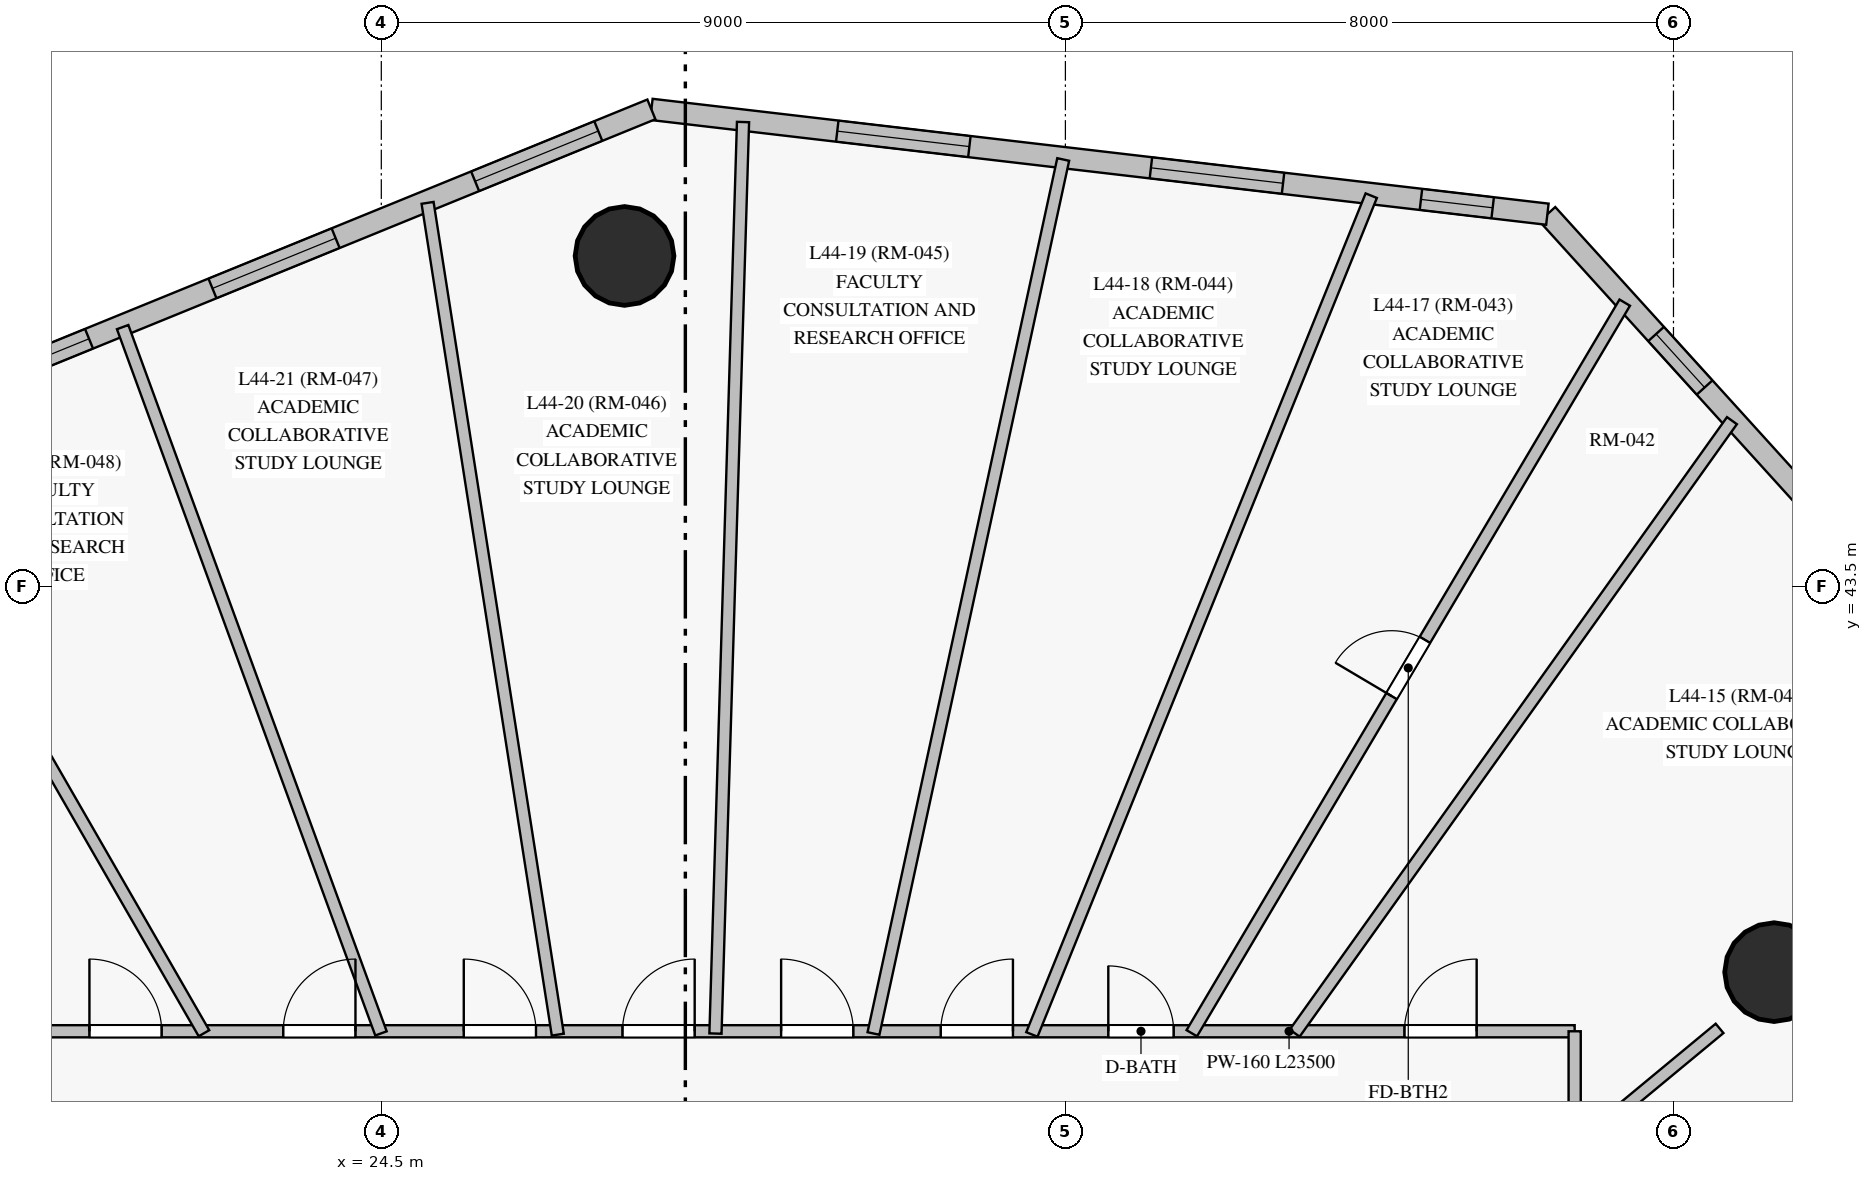
"""IFC4 building model, lengths in metres.
Left out: names, types, materials, properties, quantities, classifications, styles, units other than length and angle.
Written with IfcOpenShell. Run it as: python <this file> out.ifc"""

import sys

from ifc_helpers import new_model, si_unit, direction, frame, frame_2d, origin, origin_with_axes, origin_2d, place, context, subcontext, project, spatial, rectangle, circle, extrude, source, transform, mapped, element, fill, save


model = new_model("IFC4")
c1 = context("Model", 3, precision=1e-05, world=origin(), true_north=direction((0.0, 1.0)))
c2 = subcontext(c1, "Body", "Model", "MODEL_VIEW")
j1 = project(units=[si_unit("LENGTHUNIT", "METRE"), si_unit("PLANEANGLEUNIT", "RADIAN")], contexts=[c1])
p1 = place(None, origin())
s1 = spatial("IfcSite", under=j1, at=p1, CompositionType="ELEMENT")
p2 = place(p1, origin())
s2 = spatial("IfcBuilding", under=s1, at=p2, CompositionType="ELEMENT")
p3 = place(p2, frame((0.0, 0.0, 156.55)))
s3 = spatial("IfcBuildingStorey", under=s2, at=p3, CompositionType="ELEMENT", Elevation=156.55)
m1 = source(origin_with_axes(), c2, "Body", "SweptSolid", [
    extrude(circle(Radius=0.65, at=origin_2d()), origin(), (0.0, 0.0, 1.0), 3.05),
])
for number, where, z_axis, x_axis in (
    (1, (42.824, 38.428, 0.0), (0.0, 0.0, 1.0), (1.0, 0.0, 0.0)),
    (2, (27.7, 47.85, 0.0), (0.0, 0.0, 1.0), (1.0, 0.0, 0.0)),
):
    element("IfcColumn", number, at=place(p3, frame(where, z_axis=z_axis, x_axis=x_axis)), inside=s3, PredefinedType="COLUMN", context=c2, shape_type="MappedRepresentation", body=[
        mapped(m1, transform((0.0, 0.0, 0.0), scale=1.0)),
    ])
p4 = place(p3, frame((46.188, 41.403, 0.0), z_axis=(0.0, 0.0, 1.0), x_axis=(-0.671855500446, 0.740682243962, 0.0)))
e3 = element("IfcWall", 3, at=p4, inside=s3, PredefinedType="SOLIDWALL", context=c2, shape_type="SweptSolid", body=[
    extrude(rectangle(XDim=9.446, YDim=0.28, at=frame_2d((4.723, 0.0))), origin(), (0.0, 0.0, 1.0), 2.825),
])
p5 = place(p4, frame((2.053, 0.0, 0.85)))
e4 = element("IfcOpeningElement", 4, at=p5, cuts=e3, PredefinedType="OPENING", context=c2, shape_type="SweptSolid", body=[
    extrude(rectangle(XDim=1.75, YDim=1.65, at=frame_2d((0.875, 0.825))), frame((0.0, 0.15, 0.0), z_axis=(0.0, -1.0, 0.0), x_axis=(1.0, 0.0, 0.0)), (0.0, 0.0, 1.0), 0.3),
])
p6 = place(p4, frame((6.368, 0.0, 0.85)))
e5 = element("IfcOpeningElement", 5, at=p6, cuts=e3, PredefinedType="OPENING", context=c2, shape_type="SweptSolid", body=[
    extrude(rectangle(XDim=0.95, YDim=1.5, at=frame_2d((0.475, 0.75))), frame((0.0, 0.15, 0.0), z_axis=(0.0, -1.0, 0.0), x_axis=(1.0, 0.0, 0.0)), (0.0, 0.0, 1.0), 0.3),
])
p7 = place(p3, frame((39.841, 48.399, 0.0), z_axis=(0.0, 0.0, 1.0), x_axis=(-0.993227616233, 0.116184776764, 0.0)))
e6 = element("IfcWall", 6, at=p7, inside=s3, PredefinedType="SOLIDWALL", context=c2, shape_type="SweptSolid", body=[
    extrude(rectangle(XDim=11.868, YDim=0.28, at=frame_2d((5.934, 0.0))), origin(), (0.0, 0.0, 1.0), 2.825),
])
p8 = place(p7, frame((0.725, 0.0, 0.85)))
e7 = element("IfcOpeningElement", 7, at=p8, cuts=e6, PredefinedType="OPENING", context=c2, shape_type="SweptSolid", body=[
    extrude(rectangle(XDim=0.95, YDim=1.5, at=frame_2d((0.475, 0.75))), frame((0.0, 0.15, 0.0), z_axis=(0.0, -1.0, 0.0), x_axis=(1.0, 0.0, 0.0)), (0.0, 0.0, 1.0), 0.3),
])
p9 = place(p7, frame((3.501, 0.0, 0.85)))
e8 = element("IfcOpeningElement", 8, at=p9, cuts=e6, PredefinedType="OPENING", context=c2, shape_type="SweptSolid", body=[
    extrude(rectangle(XDim=1.75, YDim=1.65, at=frame_2d((0.875, 0.825))), frame((0.0, 0.15, 0.0), z_axis=(0.0, -1.0, 0.0), x_axis=(1.0, 0.0, 0.0)), (0.0, 0.0, 1.0), 0.3),
])
p10 = place(p7, frame((7.656, 0.0, 0.85)))
e9 = element("IfcOpeningElement", 9, at=p10, cuts=e6, PredefinedType="OPENING", context=c2, shape_type="SweptSolid", body=[
    extrude(rectangle(XDim=1.75, YDim=1.65, at=frame_2d((0.875, 0.825))), frame((0.0, 0.15, 0.0), z_axis=(0.0, -1.0, 0.0), x_axis=(1.0, 0.0, 0.0)), (0.0, 0.0, 1.0), 0.3),
])
p11 = place(p3, frame((28.053, 49.778, 0.0), z_axis=(0.0, 0.0, 1.0), x_axis=(-0.925936748152, -0.377678617903, 0.0)))
e10 = element("IfcWall", 10, at=p11, inside=s3, PredefinedType="SOLIDWALL", context=c2, shape_type="SweptSolid", body=[
    extrude(rectangle(XDim=9.466, YDim=0.28, at=frame_2d((4.733, 0.0))), origin(), (0.0, 0.0, 1.0), 2.825),
])
p12 = place(p11, frame((0.754, 0.0, 0.85)))
e11 = element("IfcOpeningElement", 11, at=p12, cuts=e10, PredefinedType="OPENING", context=c2, shape_type="SweptSolid", body=[
    extrude(rectangle(XDim=1.75, YDim=1.65, at=frame_2d((0.875, 0.825))), frame((0.0, 0.15, 0.0), z_axis=(0.0, -1.0, 0.0), x_axis=(1.0, 0.0, 0.0)), (0.0, 0.0, 1.0), 0.3),
])
p13 = place(p11, frame((4.486, 0.0, 0.85)))
e12 = element("IfcOpeningElement", 12, at=p13, cuts=e10, PredefinedType="OPENING", context=c2, shape_type="SweptSolid", body=[
    extrude(rectangle(XDim=1.75, YDim=1.65, at=frame_2d((0.875, 0.825))), frame((0.0, 0.15, 0.0), z_axis=(0.0, -1.0, 0.0), x_axis=(1.0, 0.0, 0.0)), (0.0, 0.0, 1.0), 0.3),
])
p14 = place(p11, frame((7.99, 0.0, 0.85)))
e13 = element("IfcOpeningElement", 13, at=p14, cuts=e10, PredefinedType="OPENING", context=c2, shape_type="SweptSolid", body=[
    extrude(rectangle(XDim=0.95, YDim=1.5, at=frame_2d((0.475, 0.75))), frame((0.0, 0.15, 0.0), z_axis=(0.0, -1.0, 0.0), x_axis=(1.0, 0.0, 0.0)), (0.0, 0.0, 1.0), 0.3),
])
p15 = place(p3, frame((16.7, 37.65, 0.0), z_axis=(0.0, 0.0, 1.0), x_axis=(1.0, 0.0, 0.0)))
e14 = element("IfcWall", 14, at=p15, inside=s3, PredefinedType="PARTITIONING", context=c2, shape_type="SweptSolid", body=[
    extrude(rectangle(XDim=23.5, YDim=0.16, at=frame_2d((11.75, 0.0))), origin(), (0.0, 0.0, 1.0), 2.375),
])
p16 = place(p15, frame((21.26, 0.0, 0.0)))
e15 = element("IfcOpeningElement", 15, at=p16, cuts=e14, PredefinedType="OPENING", context=c2, shape_type="SweptSolid", body=[
    extrude(rectangle(XDim=0.95, YDim=2.15, at=frame_2d((0.475, 1.075))), frame((0.0, 0.09, 0.0), z_axis=(0.0, -1.0, 0.0), x_axis=(1.0, 0.0, 0.0)), (0.0, 0.0, 1.0), 0.18),
])
p17 = place(p15, frame((17.365, 0.0, 0.0)))
e16 = element("IfcOpeningElement", 16, at=p17, cuts=e14, PredefinedType="OPENING", context=c2, shape_type="SweptSolid", body=[
    extrude(rectangle(XDim=0.86, YDim=2.1, at=frame_2d((0.43, 1.05))), frame((0.0, 0.09, 0.0), z_axis=(0.0, -1.0, 0.0), x_axis=(1.0, 0.0, 0.0)), (0.0, 0.0, 1.0), 0.18),
])
p18 = place(p15, frame((15.16, 0.0, 0.0)))
e17 = element("IfcOpeningElement", 17, at=p18, cuts=e14, PredefinedType="OPENING", context=c2, shape_type="SweptSolid", body=[
    extrude(rectangle(XDim=0.95, YDim=2.15, at=frame_2d((0.475, 1.075))), frame((0.0, 0.09, 0.0), z_axis=(0.0, -1.0, 0.0), x_axis=(1.0, 0.0, 0.0)), (0.0, 0.0, 1.0), 0.18),
])
p19 = place(p15, frame((13.06, 0.0, 0.0)))
e18 = element("IfcOpeningElement", 18, at=p19, cuts=e14, PredefinedType="OPENING", context=c2, shape_type="SweptSolid", body=[
    extrude(rectangle(XDim=0.95, YDim=2.15, at=frame_2d((0.475, 1.075))), frame((0.0, 0.09, 0.0), z_axis=(0.0, -1.0, 0.0), x_axis=(1.0, 0.0, 0.0)), (0.0, 0.0, 1.0), 0.18),
])
p20 = place(p15, frame((10.973, 0.0, 0.0)))
e19 = element("IfcOpeningElement", 19, at=p20, cuts=e14, PredefinedType="OPENING", context=c2, shape_type="SweptSolid", body=[
    extrude(rectangle(XDim=0.95, YDim=2.15, at=frame_2d((0.475, 1.075))), frame((0.0, 0.09, 0.0), z_axis=(0.0, -1.0, 0.0), x_axis=(1.0, 0.0, 0.0)), (0.0, 0.0, 1.0), 0.18),
])
p21 = place(p15, frame((8.885, 0.0, 0.0)))
e20 = element("IfcOpeningElement", 20, at=p21, cuts=e14, PredefinedType="OPENING", context=c2, shape_type="SweptSolid", body=[
    extrude(rectangle(XDim=0.95, YDim=2.15, at=frame_2d((0.475, 1.075))), frame((0.0, 0.09, 0.0), z_axis=(0.0, -1.0, 0.0), x_axis=(1.0, 0.0, 0.0)), (0.0, 0.0, 1.0), 0.18),
])
p22 = place(p15, frame((6.51, 0.0, 0.0)))
e21 = element("IfcOpeningElement", 21, at=p22, cuts=e14, PredefinedType="OPENING", context=c2, shape_type="SweptSolid", body=[
    extrude(rectangle(XDim=0.95, YDim=2.15, at=frame_2d((0.475, 1.075))), frame((0.0, 0.09, 0.0), z_axis=(0.0, -1.0, 0.0), x_axis=(1.0, 0.0, 0.0)), (0.0, 0.0, 1.0), 0.18),
])
p23 = place(p15, frame((3.96, 0.0, 0.0)))
e22 = element("IfcOpeningElement", 22, at=p23, cuts=e14, PredefinedType="OPENING", context=c2, shape_type="SweptSolid", body=[
    extrude(rectangle(XDim=0.95, YDim=2.15, at=frame_2d((0.475, 1.075))), frame((0.0, 0.09, 0.0), z_axis=(0.0, -1.0, 0.0), x_axis=(1.0, 0.0, 0.0)), (0.0, 0.0, 1.0), 0.18),
])
p24 = place(p15, frame((2.364, 0.0, 0.0)))
e23 = element("IfcOpeningElement", 23, at=p24, cuts=e14, PredefinedType="OPENING", context=c2, shape_type="SweptSolid", body=[
    extrude(rectangle(XDim=0.95, YDim=2.15, at=frame_2d((0.475, 1.075))), frame((0.0, 0.09, 0.0), z_axis=(0.0, -1.0, 0.0), x_axis=(1.0, 0.0, 0.0)), (0.0, 0.0, 1.0), 0.18),
])
p25 = place(p3, frame((40.2, 37.65, 0.0), z_axis=(0.0, 0.0, 1.0), x_axis=(0.0, -1.0, 0.0)))
e24 = element("IfcWall", 24, at=p25, inside=s3, PredefinedType="PARTITIONING", context=c2, shape_type="SweptSolid", body=[
    extrude(rectangle(XDim=22.3, YDim=0.16, at=frame_2d((11.15, 0.0))), origin(), (0.0, 0.0, 1.0), 2.375),
])
p26 = place(p25, frame((16.25, 0.0, 0.0)))
e25 = element("IfcOpeningElement", 25, at=p26, cuts=e24, PredefinedType="OPENING", context=c2, shape_type="SweptSolid", body=[
    extrude(rectangle(XDim=0.95, YDim=2.15, at=frame_2d((0.475, 1.075))), frame((0.0, 0.09, 0.0), z_axis=(0.0, -1.0, 0.0), x_axis=(1.0, 0.0, 0.0)), (0.0, 0.0, 1.0), 0.18),
])
p27 = place(p25, frame((11.115, 0.0, 0.0)))
e26 = element("IfcOpeningElement", 26, at=p27, cuts=e24, PredefinedType="OPENING", context=c2, shape_type="SweptSolid", body=[
    extrude(rectangle(XDim=0.95, YDim=2.15, at=frame_2d((0.475, 1.075))), frame((0.0, 0.09, 0.0), z_axis=(0.0, -1.0, 0.0), x_axis=(1.0, 0.0, 0.0)), (0.0, 0.0, 1.0), 0.18),
])
p28 = place(p25, frame((7.33, 0.0, 0.0)))
e27 = element("IfcOpeningElement", 27, at=p28, cuts=e24, PredefinedType="OPENING", context=c2, shape_type="SweptSolid", body=[
    extrude(rectangle(XDim=0.95, YDim=2.15, at=frame_2d((0.475, 1.075))), frame((0.0, 0.09, 0.0), z_axis=(0.0, -1.0, 0.0), x_axis=(1.0, 0.0, 0.0)), (0.0, 0.0, 1.0), 0.18),
])
p29 = place(p25, frame((5.01, 0.0, 0.0)))
e28 = element("IfcOpeningElement", 28, at=p29, cuts=e24, PredefinedType="OPENING", context=c2, shape_type="SweptSolid", body=[
    extrude(rectangle(XDim=0.95, YDim=2.15, at=frame_2d((0.475, 1.075))), frame((0.0, 0.09, 0.0), z_axis=(0.0, -1.0, 0.0), x_axis=(1.0, 0.0, 0.0)), (0.0, 0.0, 1.0), 0.18),
])
p30 = place(p3, frame((28.896, 37.62, 0.0), z_axis=(0.0, 0.0, 1.0), x_axis=(0.030219507722, 0.999543286383, 0.0)))
e29 = element("IfcWall", 29, at=p30, inside=s3, PredefinedType="PARTITIONING", context=c2, shape_type="SweptSolid", body=[
    extrude(rectangle(XDim=11.997, YDim=0.16, at=frame_2d((5.999, 0.0))), origin(), (0.0, 0.0, 1.0), 2.825),
])
p31 = place(p3, frame((33.059, 37.608, 0.0), z_axis=(0.0, 0.0, 1.0), x_axis=(0.375079467642, 0.926992660679, 0.0)))
e30 = element("IfcWall", 30, at=p31, inside=s3, PredefinedType="PARTITIONING", context=c2, shape_type="SweptSolid", body=[
    extrude(rectangle(XDim=11.904, YDim=0.16, at=frame_2d((5.952, 0.0))), origin(), (0.0, 0.0, 1.0), 2.825),
])
p32 = place(p3, frame((30.975, 37.621, 0.0), z_axis=(0.0, 0.0, 1.0), x_axis=(0.212118658354, 0.977243917749, 0.0)))
e31 = element("IfcWall", 31, at=p32, inside=s3, PredefinedType="PARTITIONING", context=c2, shape_type="SweptSolid", body=[
    extrude(rectangle(XDim=11.766, YDim=0.16, at=frame_2d((5.883, 0.0))), origin(), (0.0, 0.0, 1.0), 2.825),
])
p33 = place(p3, frame((35.163, 37.624, 0.0), z_axis=(0.0, 0.0, 1.0), x_axis=(0.509838328303, 0.860270236026, 0.0)))
e32 = element("IfcWall", 32, at=p33, inside=s3, PredefinedType="PARTITIONING", context=c2, shape_type="SweptSolid", body=[
    extrude(rectangle(XDim=11.173, YDim=0.16, at=frame_2d((5.586, 0.0))), origin(), (0.0, 0.0, 1.0), 2.825),
])
p34 = place(p33, frame((5.156, 0.0, 0.0)))
e33 = element("IfcOpeningElement", 33, at=p34, cuts=e32, PredefinedType="OPENING", context=c2, shape_type="SweptSolid", body=[
    extrude(rectangle(XDim=0.86, YDim=2.04, at=frame_2d((0.43, 1.02))), frame((0.0, 0.09, 0.0), z_axis=(0.0, -1.0, 0.0), x_axis=(1.0, 0.0, 0.0)), (0.0, 0.0, 1.0), 0.18),
])
p35 = place(p3, frame((26.822, 37.606, 0.0), z_axis=(0.0, 0.0, 1.0), x_axis=(-0.154668693612, 0.987966393769, 0.0)))
e34 = element("IfcWall", 34, at=p35, inside=s3, PredefinedType="PARTITIONING", context=c2, shape_type="SweptSolid", body=[
    extrude(rectangle(XDim=11.076, YDim=0.16, at=frame_2d((5.538, 0.0))), origin(), (0.0, 0.0, 1.0), 2.275),
])
p36 = place(p3, frame((36.517, 37.625, 0.0), z_axis=(0.0, 0.0, 1.0), x_axis=(0.581053898372, 0.813865079228, 0.0)))
e35 = element("IfcWall", 35, at=p36, inside=s3, PredefinedType="PARTITIONING", context=c2, shape_type="SweptSolid", body=[
    extrude(rectangle(XDim=9.9, YDim=0.16, at=frame_2d((4.95, 0.0))), origin(), (0.0, 0.0, 1.0), 2.825),
])
p37 = place(p3, frame((24.496, 37.622, 0.0), z_axis=(0.0, 0.0, 1.0), x_axis=(-0.343499789381, 0.939152753654, 0.0)))
e36 = element("IfcWall", 36, at=p37, inside=s3, PredefinedType="PARTITIONING", context=c2, shape_type="SweptSolid", body=[
    extrude(rectangle(XDim=9.894, YDim=0.16, at=frame_2d((4.947, 0.0))), origin(), (0.0, 0.0, 1.0), 2.825),
])
p38 = place(p3, frame((22.167, 37.624, 0.0), z_axis=(0.0, 0.0, 1.0), x_axis=(-0.498845132143, 0.866691141144, 0.0)))
e37 = element("IfcWall", 37, at=p38, inside=s3, PredefinedType="PARTITIONING", context=c2, shape_type="SweptSolid", body=[
    extrude(rectangle(XDim=8.29, YDim=0.16, at=frame_2d((4.145, 0.0))), origin(), (0.0, 0.0, 1.0), 2.825),
])
p39 = place(p3, frame((40.177, 36.09, 0.0), z_axis=(0.0, 0.0, 1.0), x_axis=(0.770222621375, 0.637775127708, 0.0)))
e38 = element("IfcWall", 38, at=p39, inside=s3, PredefinedType="PARTITIONING", context=c2, shape_type="SweptSolid", body=[
    extrude(rectangle(XDim=2.505, YDim=0.16, at=frame_2d((1.252, 0.0))), origin(), (0.0, 0.0, 1.0), 2.275),
])
m2 = source(origin_with_axes(), c2, "Body", "SweptSolid", [
    extrude(rectangle(XDim=0.95, YDim=1.5, at=frame_2d((0.475, 0.75))), frame((0.0, 0.03, 0.0), z_axis=(0.0, -1.0, 0.0), x_axis=(1.0, 0.0, 0.0)), (0.0, 0.0, 1.0), 0.06),
])
p40 = place(p6, origin())
e39 = element("IfcWindow", 39, at=p40, inside=s3, PartitioningType="SINGLE_PANEL", PredefinedType="WINDOW", context=c2, shape_type="MappedRepresentation", body=[
    mapped(m2, transform((0.0, 0.0, 0.0), scale=1.0)),
])
fill(e5, e39)
p41 = place(p8, origin())
e40 = element("IfcWindow", 40, at=p41, inside=s3, PartitioningType="SINGLE_PANEL", PredefinedType="WINDOW", context=c2, shape_type="MappedRepresentation", body=[
    mapped(m2, transform((0.0, 0.0, 0.0), scale=1.0)),
])
fill(e7, e40)
m3 = source(origin_with_axes(), c2, "Body", "SweptSolid", [
    extrude(rectangle(XDim=1.75, YDim=1.65, at=frame_2d((0.875, 0.825))), frame((0.0, 0.03, 0.0), z_axis=(0.0, -1.0, 0.0), x_axis=(1.0, 0.0, 0.0)), (0.0, 0.0, 1.0), 0.06),
])
p42 = place(p9, origin())
e41 = element("IfcWindow", 41, at=p42, inside=s3, PartitioningType="SINGLE_PANEL", PredefinedType="WINDOW", context=c2, shape_type="MappedRepresentation", body=[
    mapped(m3, transform((0.0, 0.0, 0.0), scale=1.0)),
])
fill(e8, e41)
p43 = place(p10, origin())
e42 = element("IfcWindow", 42, at=p43, inside=s3, PartitioningType="SINGLE_PANEL", PredefinedType="WINDOW", context=c2, shape_type="MappedRepresentation", body=[
    mapped(m3, transform((0.0, 0.0, 0.0), scale=1.0)),
])
fill(e9, e42)
p44 = place(p12, origin())
e43 = element("IfcWindow", 43, at=p44, inside=s3, PartitioningType="SINGLE_PANEL", PredefinedType="WINDOW", context=c2, shape_type="MappedRepresentation", body=[
    mapped(m3, transform((0.0, 0.0, 0.0), scale=1.0)),
])
fill(e11, e43)
p45 = place(p13, origin())
e44 = element("IfcWindow", 44, at=p45, inside=s3, PartitioningType="SINGLE_PANEL", PredefinedType="WINDOW", context=c2, shape_type="MappedRepresentation", body=[
    mapped(m3, transform((0.0, 0.0, 0.0), scale=1.0)),
])
fill(e12, e44)
p46 = place(p14, origin())
e45 = element("IfcWindow", 45, at=p46, inside=s3, PartitioningType="SINGLE_PANEL", PredefinedType="WINDOW", context=c2, shape_type="MappedRepresentation", body=[
    mapped(m2, transform((0.0, 0.0, 0.0), scale=1.0)),
])
fill(e13, e45)
m4 = source(origin_with_axes(), c2, "Body", "SweptSolid", [
    extrude(rectangle(XDim=0.95, YDim=2.15, at=frame_2d((0.475, 1.075))), frame((0.0, 0.025, 0.0), z_axis=(0.0, -1.0, 0.0), x_axis=(1.0, 0.0, 0.0)), (0.0, 0.0, 1.0), 0.05),
])
p47 = place(p16, origin())
e46 = element("IfcDoor", 46, at=p47, inside=s3, OperationType="SINGLE_SWING_RIGHT", PredefinedType="DOOR", context=c2, shape_type="MappedRepresentation", body=[
    mapped(m4, transform((0.0, 0.0, 0.0), scale=1.0)),
])
fill(e15, e46)
m5 = source(origin_with_axes(), c2, "Body", "SweptSolid", [
    extrude(rectangle(XDim=0.86, YDim=2.1, at=frame_2d((0.43, 1.05))), frame((0.0, 0.025, 0.0), z_axis=(0.0, -1.0, 0.0), x_axis=(1.0, 0.0, 0.0)), (0.0, 0.0, 1.0), 0.05),
])
p48 = place(p17, origin())
e47 = element("IfcDoor", 47, at=p48, inside=s3, OperationType="SINGLE_SWING_LEFT", PredefinedType="DOOR", context=c2, shape_type="MappedRepresentation", body=[
    mapped(m5, transform((0.0, 0.0, 0.0), scale=1.0)),
])
fill(e16, e47)
p49 = place(p18, origin())
e48 = element("IfcDoor", 48, at=p49, inside=s3, OperationType="SINGLE_SWING_RIGHT", PredefinedType="DOOR", context=c2, shape_type="MappedRepresentation", body=[
    mapped(m4, transform((0.0, 0.0, 0.0), scale=1.0)),
])
fill(e17, e48)
p50 = place(p19, origin())
e49 = element("IfcDoor", 49, at=p50, inside=s3, OperationType="SINGLE_SWING_LEFT", PredefinedType="DOOR", context=c2, shape_type="MappedRepresentation", body=[
    mapped(m4, transform((0.0, 0.0, 0.0), scale=1.0)),
])
fill(e18, e49)
p51 = place(p20, origin())
e50 = element("IfcDoor", 50, at=p51, inside=s3, OperationType="SINGLE_SWING_RIGHT", PredefinedType="DOOR", context=c2, shape_type="MappedRepresentation", body=[
    mapped(m4, transform((0.0, 0.0, 0.0), scale=1.0)),
])
fill(e19, e50)
p52 = place(p21, origin())
e51 = element("IfcDoor", 51, at=p52, inside=s3, OperationType="SINGLE_SWING_LEFT", PredefinedType="DOOR", context=c2, shape_type="MappedRepresentation", body=[
    mapped(m4, transform((0.0, 0.0, 0.0), scale=1.0)),
])
fill(e20, e51)
p53 = place(p22, origin())
e52 = element("IfcDoor", 52, at=p53, inside=s3, OperationType="SINGLE_SWING_RIGHT", PredefinedType="DOOR", context=c2, shape_type="MappedRepresentation", body=[
    mapped(m4, transform((0.0, 0.0, 0.0), scale=1.0)),
])
fill(e21, e52)
p54 = place(p23, origin())
e53 = element("IfcDoor", 53, at=p54, inside=s3, OperationType="SINGLE_SWING_LEFT", PredefinedType="DOOR", context=c2, shape_type="MappedRepresentation", body=[
    mapped(m4, transform((0.0, 0.0, 0.0), scale=1.0)),
])
fill(e22, e53)
m6 = source(origin_with_axes(), c2, "Body", "SweptSolid", [
    extrude(rectangle(XDim=0.86, YDim=2.04, at=frame_2d((0.43, 1.02))), frame((0.0, 0.025, 0.0), z_axis=(0.0, -1.0, 0.0), x_axis=(1.0, 0.0, 0.0)), (0.0, 0.0, 1.0), 0.05),
])
p55 = place(p34, origin())
e54 = element("IfcDoor", 54, at=p55, inside=s3, OperationType="SINGLE_SWING_LEFT", PredefinedType="DOOR", context=c2, shape_type="MappedRepresentation", body=[
    mapped(m6, transform((0.0, 0.0, 0.0), scale=1.0)),
])
fill(e33, e54)
save(model, sys.argv[1])
